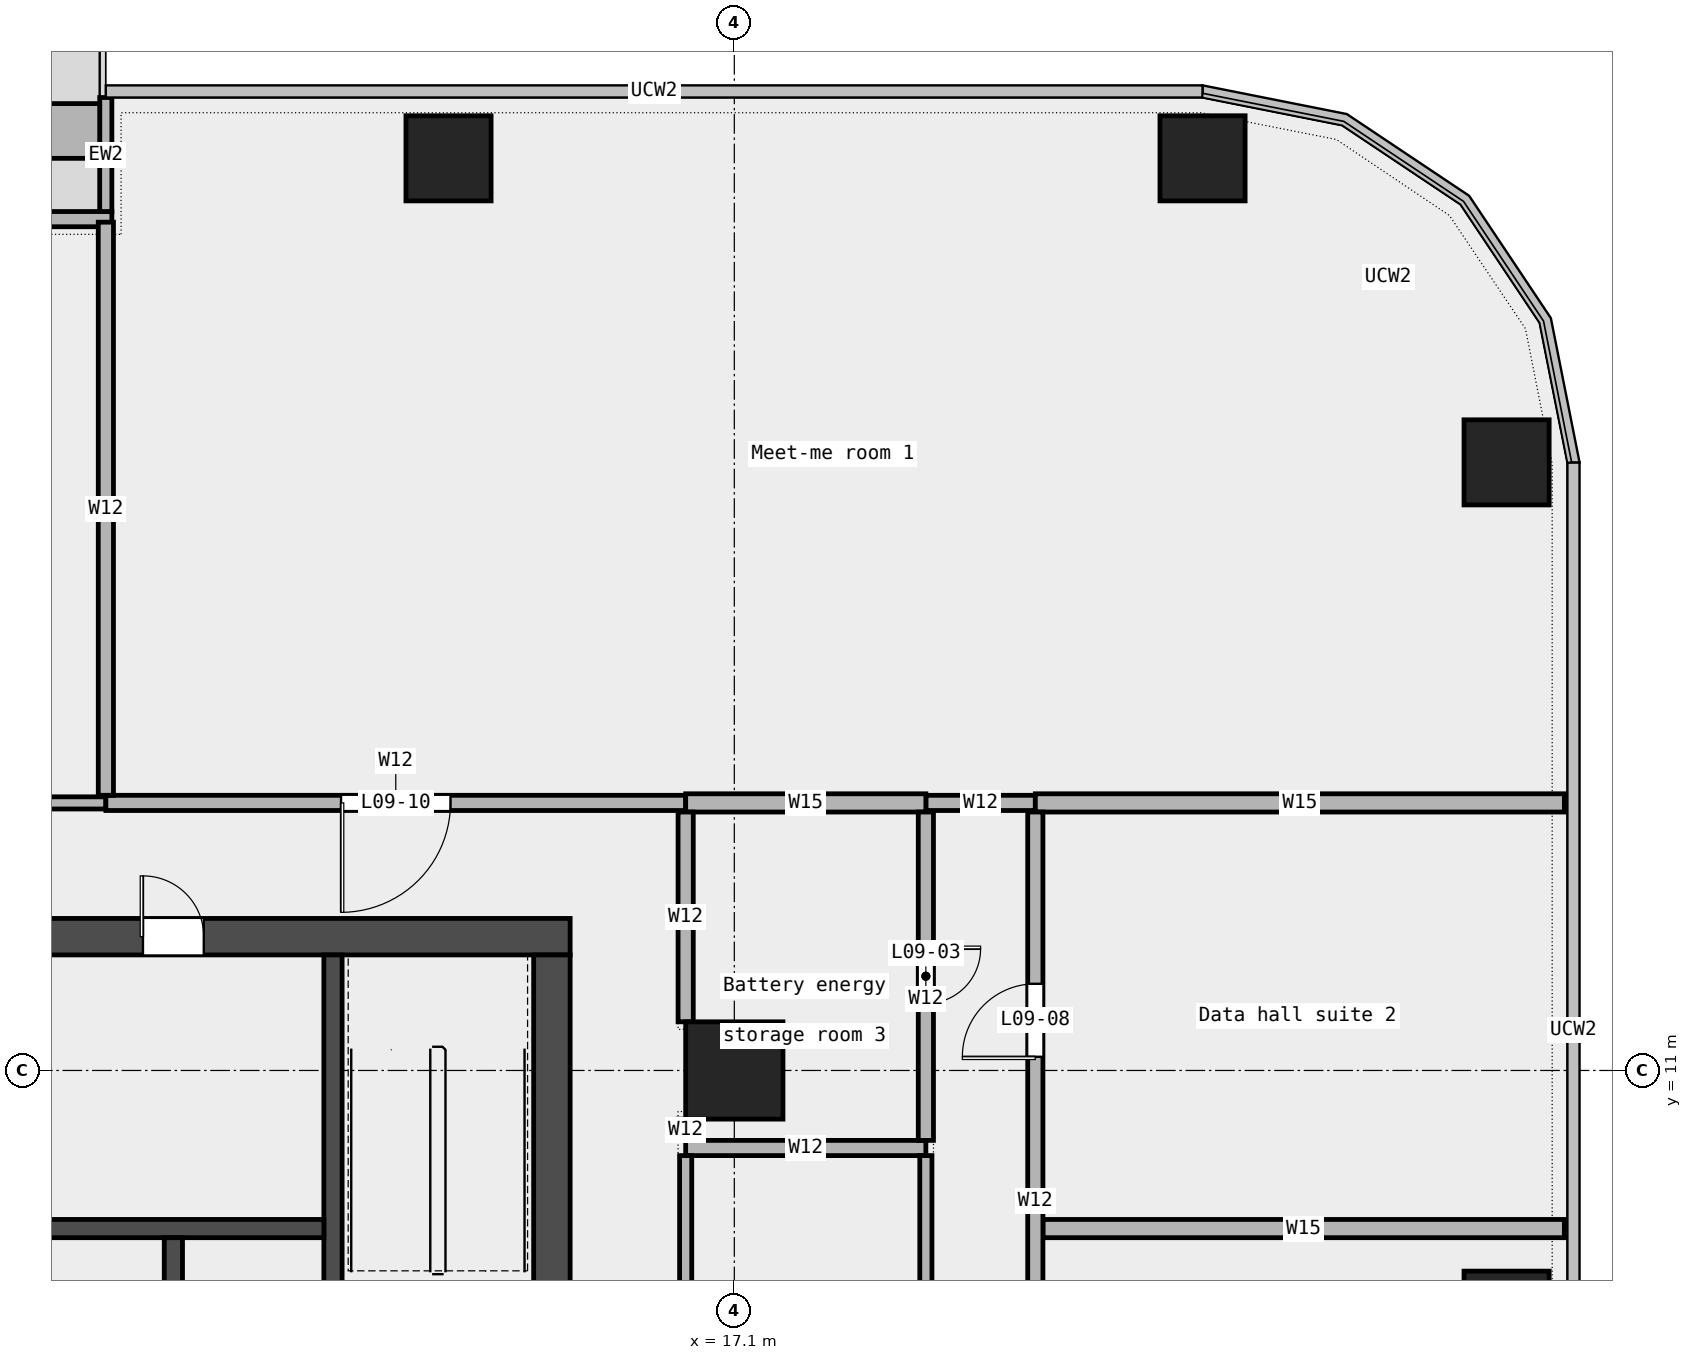
"""IFC4 building model, lengths in metres.
Left out: names, types, materials, properties, quantities, classifications, styles, units other than length and angle.
Written with IfcOpenShell. Run it as: python <this file> out.ifc"""

import sys

from ifc_helpers import new_model, si_unit, direction, frame, frame_2d, origin, origin_2d, place, context, subcontext, project, spatial, rectangle, extrude, element, fill, save


model = new_model("IFC4")
c1 = context("Model", 3, precision=1e-05, world=origin(), true_north=direction((0.0, 1.0)))
c2 = subcontext(c1, "Body", "Model", "MODEL_VIEW")
j1 = project(units=[si_unit("LENGTHUNIT", "METRE"), si_unit("PLANEANGLEUNIT", "RADIAN")], contexts=[c1])
p1 = place(None, origin())
s1 = spatial("IfcSite", under=j1, at=p1, CompositionType="ELEMENT")
p2 = place(p1, origin())
s2 = spatial("IfcBuilding", under=s1, at=p2, CompositionType="ELEMENT")
p3 = place(p2, frame((0.0, 0.0, 50.2)))
s3 = spatial("IfcBuildingStorey", under=s2, at=p3, CompositionType="ELEMENT", Elevation=50.2)
for number, where, z_axis, x_axis in (
    (1, (29.8, 7.0, 0.0), (0.0, 0.0, 1.0), (1.0, 0.0, 0.0)),
    (2, (29.8, 21.0, 0.0), (0.0, 0.0, 1.0), (1.0, 0.0, 0.0)),
    (3, (24.8, 26.0, 0.0), (0.0, 0.0, 1.0), (1.0, 0.0, 0.0)),
    (4, (12.4, 26.0, 0.0), (0.0, 0.0, 1.0), (1.0, 0.0, 0.0)),
):
    element("IfcColumn", number, at=place(p3, frame(where, z_axis=z_axis, x_axis=x_axis)), inside=s3, PredefinedType="COLUMN", context=c2, shape_type="SweptSolid", body=[
        extrude(rectangle(XDim=1.4, YDim=1.4, at=origin_2d()), origin(), (0.0, 0.0, 1.0), 4.35),
    ])
p4 = place(p3, frame((17.1, 11.0, 0.0), z_axis=(0.0, 0.0, 1.0), x_axis=(1.0, 0.0, 0.0)))
e5 = element("IfcColumn", 5, at=p4, inside=s3, PredefinedType="COLUMN", context=c2, shape_type="SweptSolid", body=[
    extrude(rectangle(XDim=1.6, YDim=1.6, at=origin_2d()), origin(), (0.0, 0.0, 1.0), 4.35),
])
p5 = place(p3, frame((6.864, 25.0, 0.0), z_axis=(0.0, 0.0, 1.0), x_axis=(-1.0, 0.0, 0.0)))
e6 = element("IfcWall", 6, at=p5, inside=s3, PredefinedType="STANDARD", context=c2, shape_type="SweptSolid", body=[
    extrude(rectangle(XDim=13.727, YDim=0.25, at=frame_2d((6.864, 0.0))), origin(), (0.0, 0.0, 1.0), 4.35),
])
p6 = place(p5, frame((1.75, 0.0, 0.45)))
e7 = element("IfcOpeningElement", 7, at=p6, cuts=e6, PredefinedType="OPENING", context=c2, shape_type="SweptSolid", body=[
    extrude(rectangle(XDim=1.5, YDim=3.0, at=frame_2d((0.75, 1.5))), frame((0.0, 0.137, 0.0), z_axis=(0.0, -1.0, 0.0), x_axis=(1.0, 0.0, 0.0)), (0.0, 0.0, 1.0), 0.274),
])
p7 = place(p5, frame((4.0, 0.0, 0.0)))
e8 = element("IfcOpeningElement", 8, at=p7, cuts=e6, PredefinedType="OPENING", context=c2, shape_type="SweptSolid", body=[
    extrude(rectangle(XDim=1.8, YDim=2.4, at=frame_2d((0.9, 1.2))), frame((0.0, 0.137, 0.0), z_axis=(0.0, -1.0, 0.0), x_axis=(1.0, 0.0, 0.0)), (0.0, 0.0, 1.0), 0.274),
])
p8 = place(p5, frame((10.5, 0.0, 0.45)))
e9 = element("IfcOpeningElement", 9, at=p8, cuts=e6, PredefinedType="OPENING", context=c2, shape_type="SweptSolid", body=[
    extrude(rectangle(XDim=1.5, YDim=3.0, at=frame_2d((0.75, 1.5))), frame((0.0, 0.137, 0.0), z_axis=(0.0, -1.0, 0.0), x_axis=(1.0, 0.0, 0.0)), (0.0, 0.0, 1.0), 0.274),
])
p9 = place(p3, frame((6.764, 27.0, 0.0), z_axis=(0.0, 0.0, 1.0), x_axis=(0.0, -1.0, 0.0)))
e10 = element("IfcWall", 10, at=p9, inside=s3, PredefinedType="STANDARD", context=c2, shape_type="SweptSolid", body=[
    extrude(rectangle(XDim=1.875, YDim=0.2, at=frame_2d((0.938, 0.0))), origin(), (0.0, 0.0, 1.0), 4.35),
])
p10 = place(p3, frame((6.664, 26.45, 0.0), z_axis=(0.0, 0.0, 1.0), x_axis=(-1.0, 0.0, 0.0)))
e11 = element("IfcWall", 11, at=p10, inside=s3, PredefinedType="STANDARD", context=c2, shape_type="SweptSolid", body=[
    extrude(rectangle(XDim=3.6, YDim=0.9, at=frame_2d((1.8, 0.0))), origin(), (0.0, 0.0, 1.0), 0.7),
])
p11 = place(p3, frame((22.175, 8.4, 0.0), z_axis=(0.0, 0.0, 1.0), x_axis=(1.0, 0.0, 0.0)))
e12 = element("IfcWall", 12, at=p11, inside=s3, PredefinedType="PARTITIONING", context=c2, shape_type="SweptSolid", body=[
    extrude(rectangle(XDim=8.575, YDim=0.3, at=frame_2d((4.288, 0.0))), origin(), (0.0, 0.0, 1.0), 4.35),
])
p12 = place(p3, frame((16.3, 9.725, 0.0), z_axis=(0.0, 0.0, 1.0), x_axis=(1.0, 0.0, 0.0)))
e13 = element("IfcWall", 13, at=p12, inside=s3, PredefinedType="PARTITIONING", context=c2, shape_type="SweptSolid", body=[
    extrude(rectangle(XDim=3.95, YDim=0.25, at=frame_2d((1.975, 0.0))), origin(), (0.0, 0.0, 1.0), 4.35),
])
p13 = place(p3, frame((-6.765, 15.4, 0.0), z_axis=(0.0, 0.0, 1.0), x_axis=(1.0, 0.0, 0.0)))
e14 = element("IfcWall", 14, at=p13, inside=s3, PredefinedType="PARTITIONING", context=c2, shape_type="SweptSolid", body=[
    extrude(rectangle(XDim=13.53, YDim=0.2, at=frame_2d((6.765, 0.0))), origin(), (0.0, 0.0, 1.0), 4.35),
])
p14 = place(p13, frame((6.015, 0.0, 0.0)))
e15 = element("IfcOpeningElement", 15, at=p14, cuts=e14, PredefinedType="OPENING", context=c2, shape_type="SweptSolid", body=[
    extrude(rectangle(XDim=1.5, YDim=2.1, at=frame_2d((0.75, 1.05))), frame((0.0, 0.112, 0.0), z_axis=(0.0, -1.0, 0.0), x_axis=(1.0, 0.0, 0.0)), (0.0, 0.0, 1.0), 0.224),
])
p15 = place(p3, frame((6.765, 15.4, 0.0), z_axis=(0.0, 0.0, 1.0), x_axis=(1.0, 0.0, 0.0)))
e16 = element("IfcWall", 16, at=p15, inside=s3, PredefinedType="PARTITIONING", context=c2, shape_type="SweptSolid", body=[
    extrude(rectangle(XDim=9.535, YDim=0.25, at=frame_2d((4.768, 0.0))), origin(), (0.0, 0.0, 1.0), 4.35),
])
p16 = place(p15, frame((3.867, 0.0, 0.0)))
e17 = element("IfcOpeningElement", 17, at=p16, cuts=e16, PredefinedType="OPENING", context=c2, shape_type="SweptSolid", body=[
    extrude(rectangle(XDim=1.8, YDim=2.1, at=frame_2d((0.9, 1.05))), frame((0.0, 0.137, 0.0), z_axis=(0.0, -1.0, 0.0), x_axis=(1.0, 0.0, 0.0)), (0.0, 0.0, 1.0), 0.274),
])
p17 = place(p3, frame((20.25, 15.4, 0.0), z_axis=(0.0, 0.0, 1.0), x_axis=(1.0, 0.0, 0.0)))
e18 = element("IfcWall", 18, at=p17, inside=s3, PredefinedType="PARTITIONING", context=c2, shape_type="SweptSolid", body=[
    extrude(rectangle(XDim=1.8, YDim=0.25, at=frame_2d((0.9, 0.0))), origin(), (0.0, 0.0, 1.0), 4.35),
])
p18 = place(p3, frame((16.3, 15.4, 0.0), z_axis=(0.0, 0.0, 1.0), x_axis=(1.0, 0.0, 0.0)))
e19 = element("IfcWall", 19, at=p18, inside=s3, PredefinedType="PARTITIONING", context=c2, shape_type="SweptSolid", body=[
    extrude(rectangle(XDim=3.95, YDim=0.3, at=frame_2d((1.975, 0.0))), origin(), (0.0, 0.0, 1.0), 4.35),
])
p19 = place(p3, frame((22.05, 15.4, 0.0), z_axis=(0.0, 0.0, 1.0), x_axis=(1.0, 0.0, 0.0)))
e20 = element("IfcWall", 20, at=p19, inside=s3, PredefinedType="PARTITIONING", context=c2, shape_type="SweptSolid", body=[
    extrude(rectangle(XDim=8.7, YDim=0.3, at=frame_2d((4.35, 0.0))), origin(), (0.0, 0.0, 1.0), 4.35),
])
p20 = place(p3, frame((6.765, 15.525, 0.0), z_axis=(0.0, 0.0, 1.0), x_axis=(0.0, 1.0, 0.0)))
e21 = element("IfcWall", 21, at=p20, inside=s3, PredefinedType="PARTITIONING", context=c2, shape_type="SweptSolid", body=[
    extrude(rectangle(XDim=9.425, YDim=0.25, at=frame_2d((4.712, 0.0))), origin(), (0.0, 0.0, 1.0), 4.35),
])
p21 = place(p3, frame((16.3, 4.15, 0.0), z_axis=(0.0, 0.0, 1.0), x_axis=(0.0, 1.0, 0.0)))
e22 = element("IfcWall", 22, at=p21, inside=s3, PredefinedType="PARTITIONING", context=c2, shape_type="SweptSolid", body=[
    extrude(rectangle(XDim=5.45, YDim=0.2, at=frame_2d((2.725, 0.0))), origin(), (0.0, 0.0, 1.0), 4.35),
])
p22 = place(p3, frame((16.3, 9.85, 0.0), z_axis=(0.0, 0.0, 1.0), x_axis=(0.0, 1.0, 0.0)))
e23 = element("IfcWall", 23, at=p22, inside=s3, PredefinedType="PARTITIONING", context=c2, shape_type="SweptSolid", body=[
    extrude(rectangle(XDim=0.35, YDim=0.25, at=frame_2d((0.175, 0.0))), origin(), (0.0, 0.0, 1.0), 4.35),
])
p23 = place(p3, frame((16.3, 11.8, 0.0), z_axis=(0.0, 0.0, 1.0), x_axis=(0.0, 1.0, 0.0)))
e24 = element("IfcWall", 24, at=p23, inside=s3, PredefinedType="PARTITIONING", context=c2, shape_type="SweptSolid", body=[
    extrude(rectangle(XDim=3.45, YDim=0.25, at=frame_2d((1.725, 0.0))), origin(), (0.0, 0.0, 1.0), 4.35),
])
p24 = place(p3, frame((20.25, 4.15, 0.0), z_axis=(0.0, 0.0, 1.0), x_axis=(0.0, 1.0, 0.0)))
e25 = element("IfcWall", 25, at=p24, inside=s3, PredefinedType="PARTITIONING", context=c2, shape_type="SweptSolid", body=[
    extrude(rectangle(XDim=5.45, YDim=0.2, at=frame_2d((2.725, 0.0))), origin(), (0.0, 0.0, 1.0), 4.35),
])
p25 = place(p24, frame((2.275, 0.0, 0.0)))
e26 = element("IfcOpeningElement", 26, at=p25, cuts=e25, PredefinedType="OPENING", context=c2, shape_type="SweptSolid", body=[
    extrude(rectangle(XDim=0.9, YDim=2.1, at=frame_2d((0.45, 1.05))), frame((0.0, 0.112, 0.0), z_axis=(0.0, -1.0, 0.0), x_axis=(1.0, 0.0, 0.0)), (0.0, 0.0, 1.0), 0.224),
])
p26 = place(p3, frame((20.25, 9.85, 0.0), z_axis=(0.0, 0.0, 1.0), x_axis=(0.0, 1.0, 0.0)))
e27 = element("IfcWall", 27, at=p26, inside=s3, PredefinedType="PARTITIONING", context=c2, shape_type="SweptSolid", body=[
    extrude(rectangle(XDim=5.4, YDim=0.25, at=frame_2d((2.7, 0.0))), origin(), (0.0, 0.0, 1.0), 4.35),
])
p27 = place(p26, frame((2.25, 0.0, 0.0)))
e28 = element("IfcOpeningElement", 28, at=p27, cuts=e27, PredefinedType="OPENING", context=c2, shape_type="SweptSolid", body=[
    extrude(rectangle(XDim=0.9, YDim=2.1, at=frame_2d((0.45, 1.05))), frame((0.0, 0.137, 0.0), z_axis=(0.0, -1.0, 0.0), x_axis=(1.0, 0.0, 0.0)), (0.0, 0.0, 1.0), 0.274),
])
p28 = place(p3, frame((22.05, 2.46, 0.0), z_axis=(0.0, 0.0, 1.0), x_axis=(0.0, 1.0, 0.0)))
e29 = element("IfcWall", 29, at=p28, inside=s3, PredefinedType="PARTITIONING", context=c2, shape_type="SweptSolid", body=[
    extrude(rectangle(XDim=12.79, YDim=0.25, at=frame_2d((6.395, 0.0))), origin(), (0.0, 0.0, 1.0), 4.35),
])
p29 = place(p28, frame((2.37, 0.0, 0.0)))
e30 = element("IfcOpeningElement", 30, at=p29, cuts=e29, PredefinedType="OPENING", context=c2, shape_type="SweptSolid", body=[
    extrude(rectangle(XDim=1.2, YDim=2.1, at=frame_2d((0.6, 1.05))), frame((0.0, 0.137, 0.0), z_axis=(0.0, -1.0, 0.0), x_axis=(1.0, 0.0, 0.0)), (0.0, 0.0, 1.0), 0.274),
])
p30 = place(p28, frame((8.765, 0.0, 0.0)))
e31 = element("IfcOpeningElement", 31, at=p30, cuts=e29, PredefinedType="OPENING", context=c2, shape_type="SweptSolid", body=[
    extrude(rectangle(XDim=1.2, YDim=2.1, at=frame_2d((0.6, 1.05))), frame((0.0, 0.137, 0.0), z_axis=(0.0, -1.0, 0.0), x_axis=(1.0, 0.0, 0.0)), (0.0, 0.0, 1.0), 0.274),
])
p31 = place(p3, frame((-14.4, 13.2, 0.0), z_axis=(0.0, 0.0, 1.0), x_axis=(1.0, 0.0, 0.0)))
e32 = element("IfcWall", 32, at=p31, inside=s3, PredefinedType="SHEAR", context=c2, shape_type="SweptSolid", body=[
    extrude(rectangle(XDim=28.8, YDim=0.6, at=frame_2d((14.4, 0.0))), origin(), (0.0, 0.0, 1.0), 4.5),
])
p32 = place(p31, frame((4.9, 0.0, 0.0)))
e33 = element("IfcOpeningElement", 33, at=p32, cuts=e32, PredefinedType="OPENING", context=c2, shape_type="SweptSolid", body=[
    extrude(rectangle(XDim=1.0, YDim=2.1, at=frame_2d((0.5, 1.05))), frame((0.0, 0.312, 0.0), z_axis=(0.0, -1.0, 0.0), x_axis=(1.0, 0.0, 0.0)), (0.0, 0.0, 1.0), 0.624),
])
p33 = place(p31, frame((9.025, 0.0, 0.0)))
e34 = element("IfcOpeningElement", 34, at=p33, cuts=e32, PredefinedType="OPENING", context=c2, shape_type="SweptSolid", body=[
    extrude(rectangle(XDim=1.0, YDim=2.1, at=frame_2d((0.5, 1.05))), frame((0.0, 0.312, 0.0), z_axis=(0.0, -1.0, 0.0), x_axis=(1.0, 0.0, 0.0)), (0.0, 0.0, 1.0), 0.624),
])
p34 = place(p31, frame((13.337, 0.0, 0.0)))
e35 = element("IfcOpeningElement", 35, at=p34, cuts=e32, PredefinedType="OPENING", context=c2, shape_type="SweptSolid", body=[
    extrude(rectangle(XDim=1.0, YDim=2.1, at=frame_2d((0.5, 1.05))), frame((0.0, 0.312, 0.0), z_axis=(0.0, -1.0, 0.0), x_axis=(1.0, 0.0, 0.0)), (0.0, 0.0, 1.0), 0.624),
])
p35 = place(p31, frame((17.087, 0.0, 0.0)))
e36 = element("IfcOpeningElement", 36, at=p35, cuts=e32, PredefinedType="OPENING", context=c2, shape_type="SweptSolid", body=[
    extrude(rectangle(XDim=1.0, YDim=2.1, at=frame_2d((0.5, 1.05))), frame((0.0, 0.312, 0.0), z_axis=(0.0, -1.0, 0.0), x_axis=(1.0, 0.0, 0.0)), (0.0, 0.0, 1.0), 0.624),
])
p36 = place(p31, frame((21.775, 0.0, 0.0)))
e37 = element("IfcOpeningElement", 37, at=p36, cuts=e32, PredefinedType="OPENING", context=c2, shape_type="SweptSolid", body=[
    extrude(rectangle(XDim=1.0, YDim=2.1, at=frame_2d((0.5, 1.05))), frame((0.0, 0.312, 0.0), z_axis=(0.0, -1.0, 0.0), x_axis=(1.0, 0.0, 0.0)), (0.0, 0.0, 1.0), 0.624),
])
p37 = place(p3, frame((14.1, -6.6, 0.0), z_axis=(0.0, 0.0, 1.0), x_axis=(0.0, 1.0, 0.0)))
e38 = element("IfcWall", 38, at=p37, inside=s3, PredefinedType="SHEAR", context=c2, shape_type="SweptSolid", body=[
    extrude(rectangle(XDim=19.5, YDim=0.6, at=frame_2d((9.75, 0.0))), origin(), (0.0, 0.0, 1.0), 4.5),
])
p38 = place(p37, frame((9.3, 0.0, 0.0)))
e39 = element("IfcOpeningElement", 39, at=p38, cuts=e38, PredefinedType="OPENING", context=c2, shape_type="SweptSolid", body=[
    extrude(rectangle(XDim=1.8, YDim=2.1, at=frame_2d((0.9, 1.05))), frame((0.0, 0.312, 0.0), z_axis=(0.0, -1.0, 0.0), x_axis=(1.0, 0.0, 0.0)), (0.0, 0.0, 1.0), 0.624),
])
p39 = place(p3, frame((10.5, 5.25, 0.0), z_axis=(0.0, 0.0, 1.0), x_axis=(0.0, 1.0, 0.0)))
e40 = element("IfcWall", 40, at=p39, inside=s3, PredefinedType="SHEAR", context=c2, shape_type="SweptSolid", body=[
    extrude(rectangle(XDim=7.65, YDim=0.3, at=frame_2d((3.825, 0.0))), origin(), (0.0, 0.0, 1.0), 4.5),
])
p40 = place(p3, frame((-10.35, 8.4, 0.0), z_axis=(0.0, 0.0, 1.0), x_axis=(1.0, 0.0, 0.0)))
e41 = element("IfcWall", 41, at=p40, inside=s3, PredefinedType="SOLIDWALL", context=c2, shape_type="SweptSolid", body=[
    extrude(rectangle(XDim=20.7, YDim=0.3, at=frame_2d((10.35, 0.0))), origin(), (0.0, 0.0, 1.0), 4.5),
])
p41 = place(p3, frame((7.875, 5.55, 0.0), z_axis=(0.0, 0.0, 1.0), x_axis=(0.0, 1.0, 0.0)))
e42 = element("IfcWall", 42, at=p41, inside=s3, PredefinedType="SOLIDWALL", context=c2, shape_type="SweptSolid", body=[
    extrude(rectangle(XDim=2.7, YDim=0.3, at=frame_2d((1.35, 0.0))), origin(), (0.0, 0.0, 1.0), 4.5),
])
p42 = place(p27, origin())
e43 = element("IfcDoor", 43, at=p42, inside=s3, OperationType="SINGLE_SWING_LEFT", PredefinedType="DOOR", context=c2, shape_type="SweptSolid", body=[
    extrude(rectangle(XDim=0.9, YDim=2.1, at=frame_2d((0.45, 1.05))), frame((0.0, 0.025, 0.0), z_axis=(0.0, -1.0, 0.0), x_axis=(1.0, 0.0, 0.0)), (0.0, 0.0, 1.0), 0.05),
])
fill(e28, e43)
p43 = place(p30, origin())
e44 = element("IfcDoor", 44, at=p43, inside=s3, OperationType="SINGLE_SWING_LEFT", PredefinedType="DOOR", context=c2, shape_type="SweptSolid", body=[
    extrude(rectangle(XDim=1.2, YDim=2.1, at=frame_2d((0.6, 1.05))), frame((0.0, 0.025, 0.0), z_axis=(0.0, -1.0, 0.0), x_axis=(1.0, 0.0, 0.0)), (0.0, 0.0, 1.0), 0.05),
])
fill(e31, e44)
p44 = place(p16, origin())
e45 = element("IfcDoor", 45, at=p44, inside=s3, OperationType="DOUBLE_DOOR_SINGLE_SWING", PredefinedType="DOOR", context=c2, shape_type="SweptSolid", body=[
    extrude(rectangle(XDim=1.8, YDim=2.1, at=frame_2d((0.9, 1.05))), frame((0.0, 0.025, 0.0), z_axis=(0.0, -1.0, 0.0), x_axis=(1.0, 0.0, 0.0)), (0.0, 0.0, 1.0), 0.05),
])
fill(e17, e45)
p45 = place(p36, origin())
e46 = element("IfcDoor", 46, at=p45, inside=s3, OperationType="SINGLE_SWING_LEFT", PredefinedType="DOOR", context=c2, shape_type="SweptSolid", body=[
    extrude(rectangle(XDim=1.0, YDim=2.1, at=frame_2d((0.5, 1.05))), frame((0.0, 0.025, 0.0), z_axis=(0.0, -1.0, 0.0), x_axis=(1.0, 0.0, 0.0)), (0.0, 0.0, 1.0), 0.05),
])
fill(e37, e46)
save(model, sys.argv[1])
